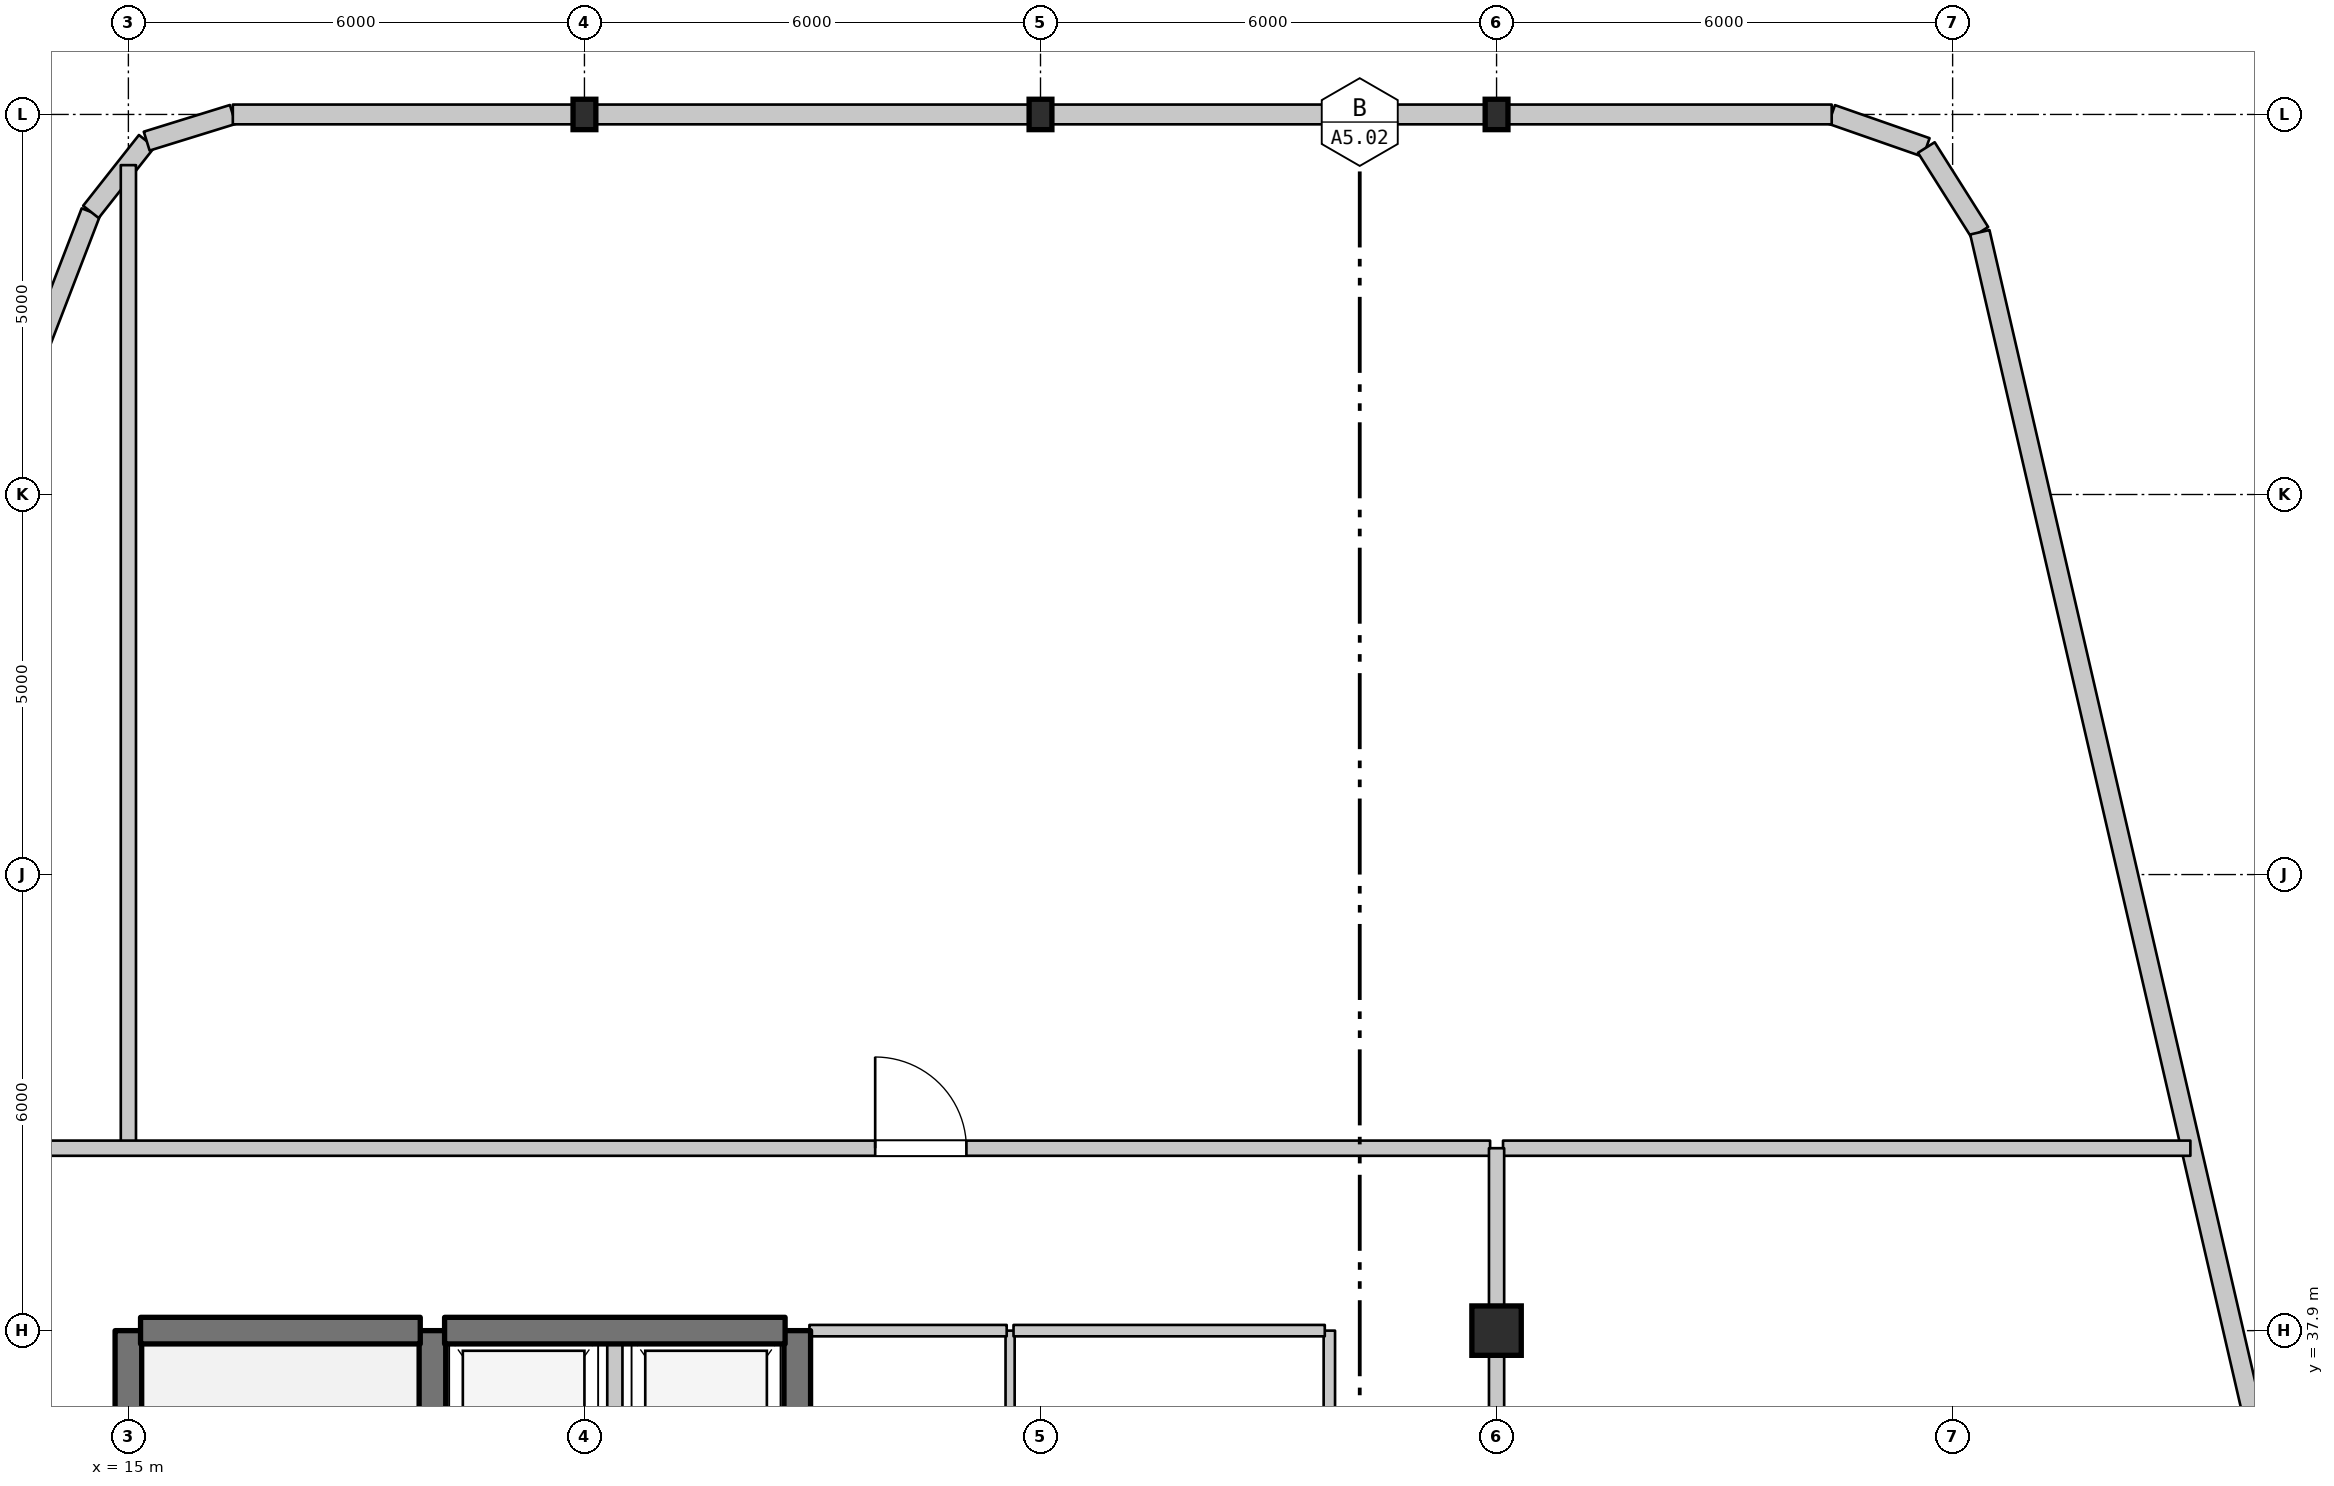
"""IFC4 building model, lengths in metres.
Left out: names, types, materials, properties, quantities, classifications, styles, units other than length and angle.
Written with IfcOpenShell. Run it as: python <this file> out.ifc"""

import sys

from ifc_helpers import new_model, si_unit, direction, frame, frame_2d, origin, origin_2d, place, context, subcontext, project, spatial, rectangle, i_section, extrude, element, fill, save


model = new_model("IFC4")
c1 = context("Model", 3, precision=1e-05, world=origin(), true_north=direction((0.0, 1.0)))
c2 = subcontext(c1, "Body", "Model", "MODEL_VIEW")
j1 = project(units=[si_unit("LENGTHUNIT", "METRE"), si_unit("PLANEANGLEUNIT", "RADIAN")], contexts=[c1])
p1 = place(None, origin())
s1 = spatial("IfcSite", under=j1, at=p1, CompositionType="ELEMENT")
p2 = place(p1, origin())
s2 = spatial("IfcBuilding", under=s1, at=p2, CompositionType="ELEMENT")
p3 = place(p2, frame((0.0, 0.0, 314.7)))
s3 = spatial("IfcBuildingStorey", under=s2, at=p3, CompositionType="ELEMENT", Elevation=314.7)
for number, where, z_axis, x_axis in (
    (1, (21.0, 53.9, 0.0), (0.0, 0.0, 1.0), (1.0, 0.0, 0.0)),
    (2, (27.0, 53.9, 0.0), (0.0, 0.0, 1.0), (1.0, 0.0, 0.0)),
):
    element("IfcColumn", number, at=place(p3, frame(where, z_axis=z_axis, x_axis=x_axis)), inside=s3, PredefinedType="COLUMN", context=c2, shape_type="SweptSolid", body=[
        extrude(i_section(OverallWidth=0.3, OverallDepth=0.4, WebThickness=0.013, FlangeThickness=0.024, FilletRadius=0.027, at=origin_2d()), origin(), (0.0, 0.0, 1.0), 5.3),
    ])
p4 = place(p3, frame((33.0, 37.9, 0.0), z_axis=(0.0, 0.0, 1.0), x_axis=(1.0, 0.0, 0.0)))
e3 = element("IfcColumn", 3, at=p4, inside=s3, PredefinedType="COLUMN", context=c2, shape_type="SweptSolid", body=[
    extrude(rectangle(XDim=0.65, YDim=0.65, at=origin_2d()), origin(), (0.0, 0.0, 1.0), 5.3),
])
p5 = place(p3, frame((33.0, 53.9, 0.0), z_axis=(0.0, 0.0, 1.0), x_axis=(1.0, 0.0, 0.0)))
e4 = element("IfcColumn", 4, at=p5, inside=s3, PredefinedType="COLUMN", context=c2, shape_type="SweptSolid", body=[
    extrude(i_section(OverallWidth=0.3, OverallDepth=0.4, WebThickness=0.013, FlangeThickness=0.024, FilletRadius=0.027, at=origin_2d()), origin(), (0.0, 0.0, 1.0), 5.3),
])
p6 = place(p3, frame((3.497, 23.993, 0.0), z_axis=(0.0, 0.0, 1.0), x_axis=(0.358990281293, 0.93334129767, 0.0)))
e5 = element("IfcWall", 5, at=p6, inside=s3, PredefinedType="STANDARD", context=c2, shape_type="SweptSolid", body=[
    extrude(rectangle(XDim=30.669, YDim=0.26, at=frame_2d((15.335, 0.0))), origin(), (0.0, 0.0, 1.0), 4.99),
])
p7 = place(p3, frame((14.507, 52.618, 0.0), z_axis=(0.0, 0.0, 1.0), x_axis=(0.619003121736, 0.78538852505, 0.0)))
e6 = element("IfcWall", 6, at=p7, inside=s3, PredefinedType="STANDARD", context=c2, shape_type="SweptSolid", body=[
    extrude(rectangle(XDim=1.186, YDim=0.26, at=frame_2d((0.593, 0.0))), origin(), (0.0, 0.0, 1.0), 4.99),
])
p8 = place(p3, frame((15.241, 53.549, 0.0), z_axis=(0.0, 0.0, 1.0), x_axis=(0.955256816454, 0.295777643879, 0.0)))
e7 = element("IfcWall", 7, at=p8, inside=s3, PredefinedType="STANDARD", context=c2, shape_type="SweptSolid", body=[
    extrude(rectangle(XDim=1.186, YDim=0.26, at=frame_2d((0.593, 0.0))), origin(), (0.0, 0.0, 1.0), 4.99),
])
p9 = place(p3, frame((16.374, 53.9, 0.0), z_axis=(0.0, 0.0, 1.0), x_axis=(1.0, 0.0, 0.0)))
e8 = element("IfcWall", 8, at=p9, inside=s3, PredefinedType="STANDARD", context=c2, shape_type="SweptSolid", body=[
    extrude(rectangle(XDim=4.626, YDim=0.26, at=frame_2d((2.313, 0.0))), origin(), (0.0, 0.0, 1.0), 4.99),
])
p10 = place(p3, frame((37.409, 53.9, 0.0), z_axis=(0.0, 0.0, 1.0), x_axis=(0.944089004862, -0.329690689737, 0.0)))
e9 = element("IfcWall", 9, at=p10, inside=s3, PredefinedType="STANDARD", context=c2, shape_type="SweptSolid", body=[
    extrude(rectangle(XDim=1.319, YDim=0.26, at=frame_2d((0.659, 0.0))), origin(), (0.0, 0.0, 1.0), 4.99),
])
p11 = place(p3, frame((38.654, 53.465, 0.0), z_axis=(0.0, 0.0, 1.0), x_axis=(0.53380488896, -0.845607675297, 0.0)))
e10 = element("IfcWall", 10, at=p11, inside=s3, PredefinedType="STANDARD", context=c2, shape_type="SweptSolid", body=[
    extrude(rectangle(XDim=1.319, YDim=0.26, at=frame_2d((0.659, 0.0))), origin(), (0.0, 0.0, 1.0), 4.99),
])
p12 = place(p3, frame((39.358, 52.35, 0.0), z_axis=(0.0, 0.0, 1.0), x_axis=(0.224832819719, -0.974397353843, 0.0)))
e11 = element("IfcWall", 11, at=p12, inside=s3, PredefinedType="STANDARD", context=c2, shape_type="SweptSolid", body=[
    extrude(rectangle(XDim=24.721, YDim=0.26, at=frame_2d((12.36, 0.0))), origin(), (0.0, 0.0, 1.0), 4.99),
])
p13 = place(p3, frame((15.0, 31.1, 0.0), z_axis=(0.0, 0.0, 1.0), x_axis=(0.0, 1.0, 0.0)))
e12 = element("IfcWall", 12, at=p13, inside=s3, PredefinedType="SHEAR", context=c2, shape_type="SweptSolid", body=[
    extrude(rectangle(XDim=6.8, YDim=0.35, at=frame_2d((3.4, 0.0))), origin(), (0.0, 0.0, 1.0), 4.99),
])
p14 = place(p3, frame((15.0, 40.3, 0.0), z_axis=(0.0, 0.0, 1.0), x_axis=(0.0, 1.0, 0.0)))
e13 = element("IfcWall", 13, at=p14, inside=s3, PredefinedType="STANDARD", context=c2, shape_type="SweptSolid", body=[
    extrude(rectangle(XDim=12.933, YDim=0.2, at=frame_2d((6.466, 0.0))), origin(), (0.0, 0.0, 1.0), 4.99),
])
p15 = place(p3, frame((19.0, 35.0, 0.0), z_axis=(0.0, 0.0, 1.0), x_axis=(0.0, 1.0, 0.0)))
e14 = element("IfcWall", 14, at=p15, inside=s3, PredefinedType="SHEAR", context=c2, shape_type="SweptSolid", body=[
    extrude(rectangle(XDim=2.9, YDim=0.35, at=frame_2d((1.45, 0.0))), origin(), (0.0, 0.0, 1.0), 4.99),
])
p16 = place(p3, frame((21.4, 35.0, 0.0), z_axis=(0.0, 0.0, 1.0), x_axis=(0.0, 1.0, 0.0)))
e15 = element("IfcWall", 15, at=p16, inside=s3, PredefinedType="STANDARD", context=c2, shape_type="SweptSolid", body=[
    extrude(rectangle(XDim=2.9, YDim=0.2, at=frame_2d((1.45, 0.0))), origin(), (0.0, 0.0, 1.0), 4.99),
])
p17 = place(p3, frame((23.8, 35.0, 0.0), z_axis=(0.0, 0.0, 1.0), x_axis=(0.0, 1.0, 0.0)))
e16 = element("IfcWall", 16, at=p17, inside=s3, PredefinedType="SHEAR", context=c2, shape_type="SweptSolid", body=[
    extrude(rectangle(XDim=2.9, YDim=0.35, at=frame_2d((1.45, 0.0))), origin(), (0.0, 0.0, 1.0), 4.99),
])
p18 = place(p3, frame((26.6, 35.0, 0.0), z_axis=(0.0, 0.0, 1.0), x_axis=(0.0, 1.0, 0.0)))
e17 = element("IfcWall", 17, at=p18, inside=s3, PredefinedType="PARTITIONING", context=c2, shape_type="SweptSolid", body=[
    extrude(rectangle(XDim=2.9, YDim=0.12, at=frame_2d((1.45, 0.0))), origin(), (0.0, 0.0, 1.0), 4.99),
])
p19 = place(p3, frame((30.8, 35.0, 0.0), z_axis=(0.0, 0.0, 1.0), x_axis=(0.0, 1.0, 0.0)))
e18 = element("IfcWall", 18, at=p19, inside=s3, PredefinedType="STANDARD", context=c2, shape_type="SweptSolid", body=[
    extrude(rectangle(XDim=2.9, YDim=0.15, at=frame_2d((1.45, 0.0))), origin(), (0.0, 0.0, 1.0), 4.99),
])
p20 = place(p3, frame((15.16, 37.9, 0.0), z_axis=(0.0, 0.0, 1.0), x_axis=(1.0, 0.0, 0.0)))
e19 = element("IfcWall", 19, at=p20, inside=s3, PredefinedType="SHEAR", context=c2, shape_type="SweptSolid", body=[
    extrude(rectangle(XDim=3.68, YDim=0.35, at=frame_2d((1.84, 0.0))), origin(), (0.0, 0.0, 1.0), 4.99),
])
p21 = place(p3, frame((19.16, 37.9, 0.0), z_axis=(0.0, 0.0, 1.0), x_axis=(1.0, 0.0, 0.0)))
e20 = element("IfcWall", 20, at=p21, inside=s3, PredefinedType="SHEAR", context=c2, shape_type="SweptSolid", body=[
    extrude(rectangle(XDim=4.48, YDim=0.35, at=frame_2d((2.24, 0.0))), origin(), (0.0, 0.0, 1.0), 4.99),
])
p22 = place(p3, frame((23.96, 37.9, 0.0), z_axis=(0.0, 0.0, 1.0), x_axis=(1.0, 0.0, 0.0)))
e21 = element("IfcWall", 21, at=p22, inside=s3, PredefinedType="STANDARD", context=c2, shape_type="SweptSolid", body=[
    extrude(rectangle(XDim=2.595, YDim=0.15, at=frame_2d((1.297, 0.0))), origin(), (0.0, 0.0, 1.0), 4.49),
])
p23 = place(p3, frame((26.645, 37.9, 0.0), z_axis=(0.0, 0.0, 1.0), x_axis=(1.0, 0.0, 0.0)))
e22 = element("IfcWall", 22, at=p23, inside=s3, PredefinedType="STANDARD", context=c2, shape_type="SweptSolid", body=[
    extrude(rectangle(XDim=4.095, YDim=0.15, at=frame_2d((2.047, 0.0))), origin(), (0.0, 0.0, 1.0), 4.49),
])
p24 = place(p3, frame((12.685, 40.3, 0.0), z_axis=(0.0, 0.0, 1.0), x_axis=(1.0, 0.0, 0.0)))
e23 = element("IfcWall", 23, at=p24, inside=s3, PredefinedType="STANDARD", context=c2, shape_type="SweptSolid", body=[
    extrude(rectangle(XDim=20.23, YDim=0.2, at=frame_2d((10.115, 0.0))), origin(), (0.0, 0.0, 1.0), 4.99),
])
p25 = place(p24, frame((12.14, 0.0, 0.0)))
e24 = element("IfcOpeningElement", 24, at=p25, cuts=e23, PredefinedType="OPENING", context=c2, shape_type="SweptSolid", body=[
    extrude(rectangle(XDim=1.2, YDim=2.2, at=frame_2d((0.6, 1.1))), frame((0.0, 0.11, 0.0), z_axis=(0.0, -1.0, 0.0), x_axis=(1.0, 0.0, 0.0)), (0.0, 0.0, 1.0), 0.22),
])
p26 = place(p3, frame((33.085, 40.3, 0.0), z_axis=(0.0, 0.0, 1.0), x_axis=(1.0, 0.0, 0.0)))
e25 = element("IfcWall", 25, at=p26, inside=s3, PredefinedType="STANDARD", context=c2, shape_type="SweptSolid", body=[
    extrude(rectangle(XDim=9.043, YDim=0.2, at=frame_2d((4.521, 0.0))), origin(), (0.0, 0.0, 1.0), 4.99),
])
p27 = place(p3, frame((21.0, 53.9, 0.0), z_axis=(0.0, 0.0, 1.0), x_axis=(1.0, 0.0, 0.0)))
e26 = element("IfcWall", 26, at=p27, inside=s3, PredefinedType="STANDARD", context=c2, shape_type="SweptSolid", body=[
    extrude(rectangle(XDim=12.0, YDim=0.26, at=frame_2d((6.0, 0.0))), origin(), (0.0, 0.0, 1.0), 4.64),
])
p28 = place(p3, frame((33.0, 53.9, 0.0), z_axis=(0.0, 0.0, 1.0), x_axis=(1.0, 0.0, 0.0)))
e27 = element("IfcWall", 27, at=p28, inside=s3, PredefinedType="STANDARD", context=c2, shape_type="SweptSolid", body=[
    extrude(rectangle(XDim=4.409, YDim=0.26, at=frame_2d((2.205, 0.0))), origin(), (0.0, 0.0, 1.0), 4.99),
])
p29 = place(p3, frame((33.0, 27.9, 0.0), z_axis=(0.0, 0.0, 1.0), x_axis=(0.0, 1.0, 0.0)))
e28 = element("IfcWall", 28, at=p29, inside=s3, PredefinedType="STANDARD", context=c2, shape_type="SweptSolid", body=[
    extrude(rectangle(XDim=10.0, YDim=0.2, at=frame_2d((5.0, 0.0))), origin(), (0.0, 0.0, 1.0), 4.49),
])
p30 = place(p3, frame((33.0, 37.9, 0.0), z_axis=(0.0, 0.0, 1.0), x_axis=(0.0, 1.0, 0.0)))
e29 = element("IfcWall", 29, at=p30, inside=s3, PredefinedType="STANDARD", context=c2, shape_type="SweptSolid", body=[
    extrude(rectangle(XDim=2.4, YDim=0.2, at=frame_2d((1.2, 0.0))), origin(), (0.0, 0.0, 1.0), 4.39),
])
p31 = place(p25, origin())
e30 = element("IfcDoor", 30, at=p31, inside=s3, OperationType="SINGLE_SWING_LEFT", PredefinedType="DOOR", context=c2, shape_type="SweptSolid", body=[
    extrude(rectangle(XDim=1.2, YDim=2.2, at=frame_2d((0.6, 1.1))), frame((0.0, 0.025, 0.0), z_axis=(0.0, -1.0, 0.0), x_axis=(1.0, 0.0, 0.0)), (0.0, 0.0, 1.0), 0.05),
])
fill(e24, e30)
save(model, sys.argv[1])
